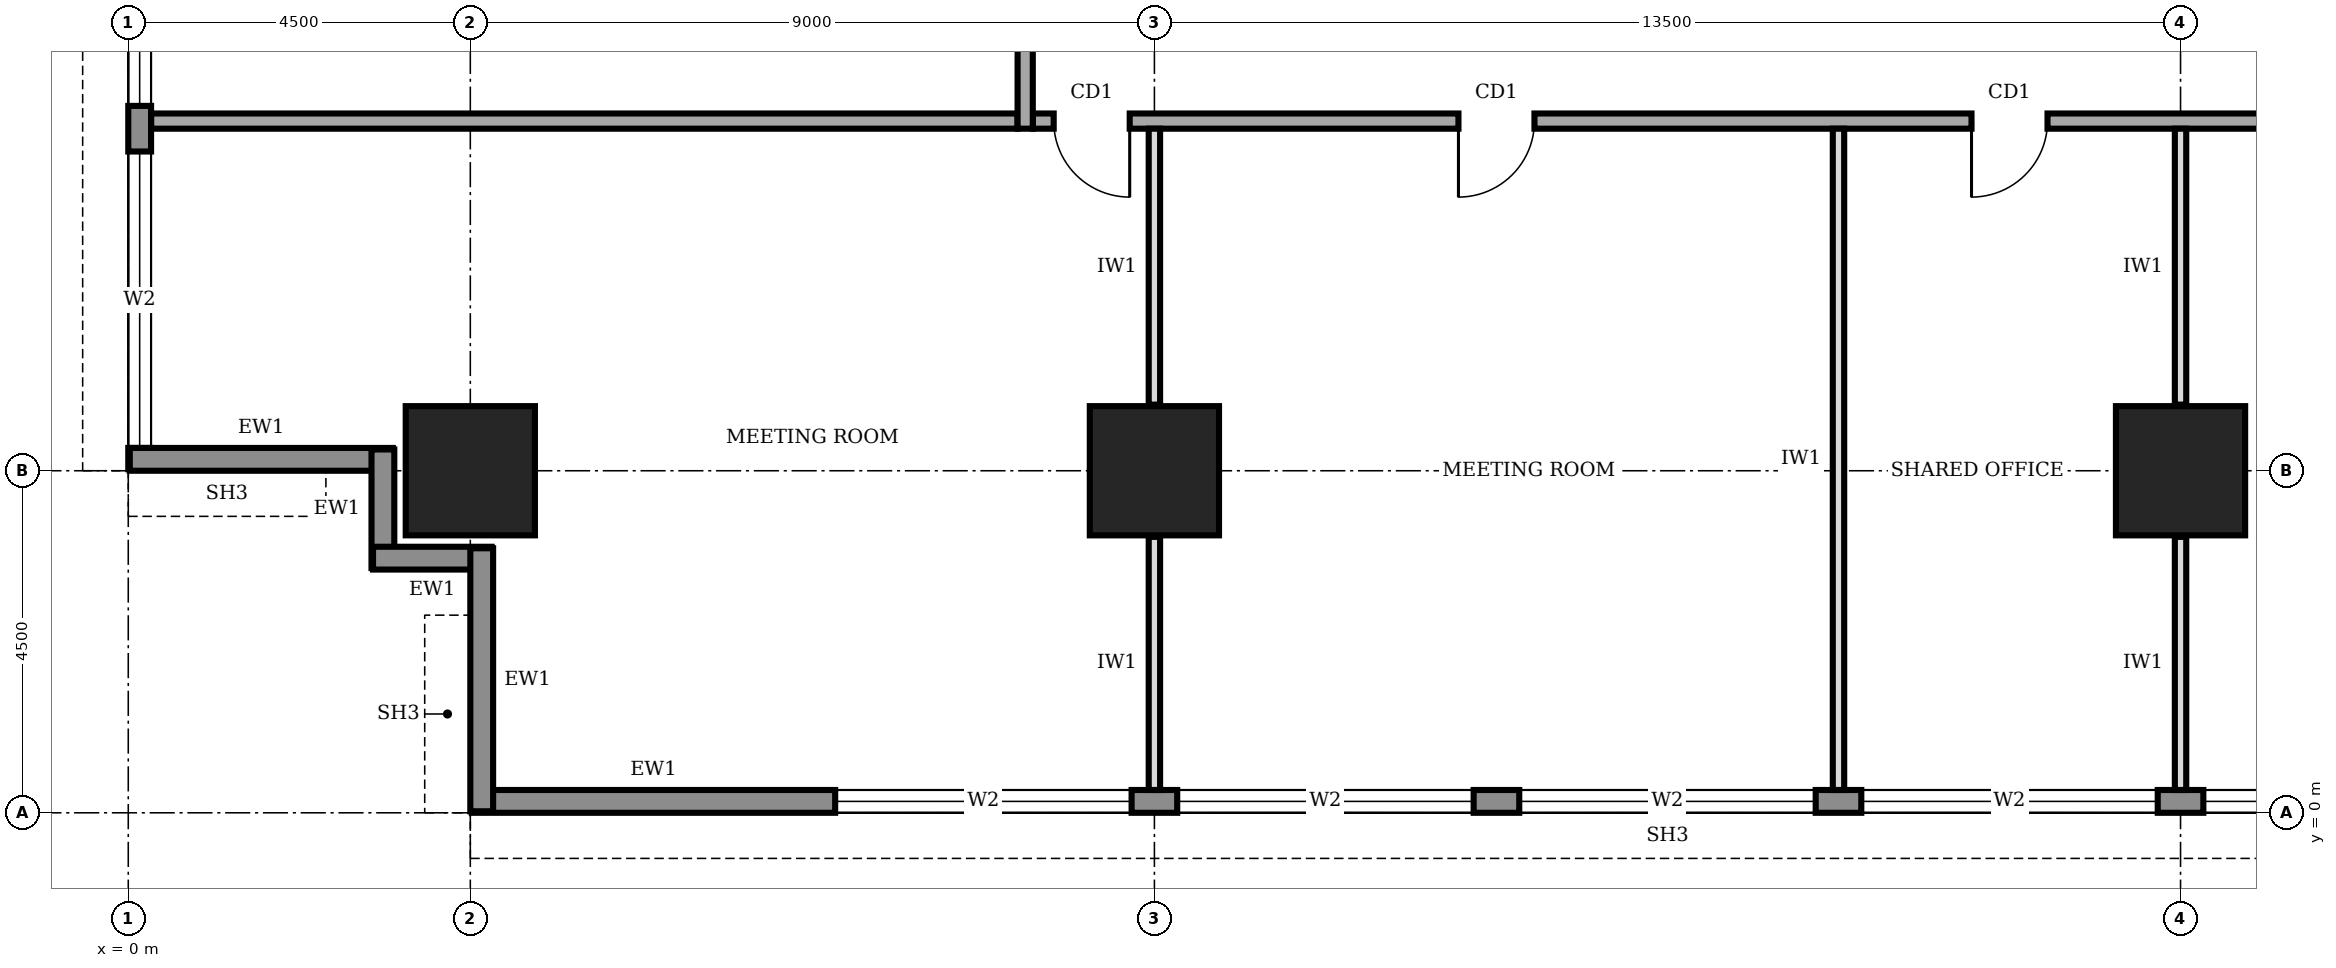
"""IFC4 building model, lengths in metres.
Left out: names, types, materials, properties, quantities, classifications, styles, units other than length and angle.
Written with IfcOpenShell. Run it as: python <this file> out.ifc"""

import sys

from ifc_helpers import new_model, si_unit, direction, frame, frame_2d, origin, origin_2d, place, context, subcontext, project, spatial, rectangle, extrude, element, fill, save


model = new_model("IFC4")
c1 = context("Model", 3, precision=1e-05, world=origin(), true_north=direction((0.0, 1.0)))
c2 = subcontext(c1, "Body", "Model", "MODEL_VIEW")
j1 = project(units=[si_unit("LENGTHUNIT", "METRE"), si_unit("PLANEANGLEUNIT", "RADIAN")], contexts=[c1])
p1 = place(None, origin())
s1 = spatial("IfcSite", under=j1, at=p1, CompositionType="ELEMENT")
p2 = place(p1, origin())
s2 = spatial("IfcBuilding", under=s1, at=p2, CompositionType="ELEMENT")
p3 = place(p2, frame((0.0, 0.0, 145.0)))
s3 = spatial("IfcBuildingStorey", under=s2, at=p3, CompositionType="ELEMENT", Elevation=145.0)
for number, where, z_axis, x_axis in (
    (1, (4.5, 4.5, 0.0), (0.0, 0.0, 1.0), (1.0, 0.0, 0.0)),
    (2, (13.5, 4.5, 0.0), (0.0, 0.0, 1.0), (1.0, 0.0, 0.0)),
    (3, (27.0, 4.5, 0.0), (0.0, 0.0, 1.0), (1.0, 0.0, 0.0)),
):
    element("IfcColumn", number, at=place(p3, frame(where, z_axis=z_axis, x_axis=x_axis)), inside=s3, PredefinedType="COLUMN", context=c2, shape_type="SweptSolid", body=[
        extrude(rectangle(XDim=1.7, YDim=1.7, at=origin_2d()), origin(), (0.0, 0.0, 1.0), 4.0),
    ])
p4 = place(p3, frame((4.52, 0.15, 0.0), z_axis=(0.0, 0.0, 1.0), x_axis=(1.0, 0.0, 0.0)))
e4 = element("IfcWall", 4, at=p4, inside=s3, PredefinedType="STANDARD", context=c2, shape_type="SweptSolid", body=[
    extrude(rectangle(XDim=31.46, YDim=0.3, at=frame_2d((15.73, 0.0))), origin(), (0.0, 0.0, 1.0), 3.75),
])
p5 = place(p4, frame((4.78, 0.0, 0.6)))
e5 = element("IfcOpeningElement", 5, at=p5, cuts=e4, PredefinedType="OPENING", context=c2, shape_type="SweptSolid", body=[
    extrude(rectangle(XDim=3.9, YDim=2.6, at=frame_2d((1.95, 1.3))), frame((0.0, 0.16, 0.0), z_axis=(0.0, -1.0, 0.0), x_axis=(1.0, 0.0, 0.0)), (0.0, 0.0, 1.0), 0.32),
])
p6 = place(p4, frame((9.28, 0.0, 0.6)))
e6 = element("IfcOpeningElement", 6, at=p6, cuts=e4, PredefinedType="OPENING", context=c2, shape_type="SweptSolid", body=[
    extrude(rectangle(XDim=3.9, YDim=2.6, at=frame_2d((1.95, 1.3))), frame((0.0, 0.16, 0.0), z_axis=(0.0, -1.0, 0.0), x_axis=(1.0, 0.0, 0.0)), (0.0, 0.0, 1.0), 0.32),
])
p7 = place(p4, frame((13.78, 0.0, 0.6)))
e7 = element("IfcOpeningElement", 7, at=p7, cuts=e4, PredefinedType="OPENING", context=c2, shape_type="SweptSolid", body=[
    extrude(rectangle(XDim=3.9, YDim=2.6, at=frame_2d((1.95, 1.3))), frame((0.0, 0.16, 0.0), z_axis=(0.0, -1.0, 0.0), x_axis=(1.0, 0.0, 0.0)), (0.0, 0.0, 1.0), 0.32),
])
p8 = place(p4, frame((18.28, 0.0, 0.6)))
e8 = element("IfcOpeningElement", 8, at=p8, cuts=e4, PredefinedType="OPENING", context=c2, shape_type="SweptSolid", body=[
    extrude(rectangle(XDim=3.9, YDim=2.6, at=frame_2d((1.95, 1.3))), frame((0.0, 0.16, 0.0), z_axis=(0.0, -1.0, 0.0), x_axis=(1.0, 0.0, 0.0)), (0.0, 0.0, 1.0), 0.32),
])
p9 = place(p4, frame((22.78, 0.0, 0.6)))
e9 = element("IfcOpeningElement", 9, at=p9, cuts=e4, PredefinedType="OPENING", context=c2, shape_type="SweptSolid", body=[
    extrude(rectangle(XDim=3.9, YDim=2.6, at=frame_2d((1.95, 1.3))), frame((0.0, 0.16, 0.0), z_axis=(0.0, -1.0, 0.0), x_axis=(1.0, 0.0, 0.0)), (0.0, 0.0, 1.0), 0.32),
])
p10 = place(p4, frame((27.28, 0.0, 0.6)))
e10 = element("IfcOpeningElement", 10, at=p10, cuts=e4, PredefinedType="OPENING", context=c2, shape_type="SweptSolid", body=[
    extrude(rectangle(XDim=3.9, YDim=2.6, at=frame_2d((1.95, 1.3))), frame((0.0, 0.16, 0.0), z_axis=(0.0, -1.0, 0.0), x_axis=(1.0, 0.0, 0.0)), (0.0, 0.0, 1.0), 0.32),
])
p11 = place(p3, frame((0.15, 35.98, 0.0), z_axis=(0.0, 0.0, 1.0), x_axis=(0.0, -1.0, 0.0)))
e11 = element("IfcWall", 11, at=p11, inside=s3, PredefinedType="STANDARD", context=c2, shape_type="SweptSolid", body=[
    extrude(rectangle(XDim=31.46, YDim=0.3, at=frame_2d((15.73, 0.0))), origin(), (0.0, 0.0, 1.0), 3.75),
])
p12 = place(p11, frame((27.28, 0.0, 0.6)))
e12 = element("IfcOpeningElement", 12, at=p12, cuts=e11, PredefinedType="OPENING", context=c2, shape_type="SweptSolid", body=[
    extrude(rectangle(XDim=3.9, YDim=2.6, at=frame_2d((1.95, 1.3))), frame((0.0, 0.16, 0.0), z_axis=(0.0, -1.0, 0.0), x_axis=(1.0, 0.0, 0.0)), (0.0, 0.0, 1.0), 0.32),
])
p13 = place(p11, frame((22.78, 0.0, 0.6)))
e13 = element("IfcOpeningElement", 13, at=p13, cuts=e11, PredefinedType="OPENING", context=c2, shape_type="SweptSolid", body=[
    extrude(rectangle(XDim=3.9, YDim=2.6, at=frame_2d((1.95, 1.3))), frame((0.0, 0.16, 0.0), z_axis=(0.0, -1.0, 0.0), x_axis=(1.0, 0.0, 0.0)), (0.0, 0.0, 1.0), 0.32),
])
p14 = place(p11, frame((18.28, 0.0, 0.6)))
e14 = element("IfcOpeningElement", 14, at=p14, cuts=e11, PredefinedType="OPENING", context=c2, shape_type="SweptSolid", body=[
    extrude(rectangle(XDim=3.9, YDim=2.6, at=frame_2d((1.95, 1.3))), frame((0.0, 0.16, 0.0), z_axis=(0.0, -1.0, 0.0), x_axis=(1.0, 0.0, 0.0)), (0.0, 0.0, 1.0), 0.32),
])
p15 = place(p11, frame((13.78, 0.0, 0.6)))
e15 = element("IfcOpeningElement", 15, at=p15, cuts=e11, PredefinedType="OPENING", context=c2, shape_type="SweptSolid", body=[
    extrude(rectangle(XDim=3.9, YDim=2.6, at=frame_2d((1.95, 1.3))), frame((0.0, 0.16, 0.0), z_axis=(0.0, -1.0, 0.0), x_axis=(1.0, 0.0, 0.0)), (0.0, 0.0, 1.0), 0.32),
])
p16 = place(p11, frame((9.28, 0.0, 0.6)))
e16 = element("IfcOpeningElement", 16, at=p16, cuts=e11, PredefinedType="OPENING", context=c2, shape_type="SweptSolid", body=[
    extrude(rectangle(XDim=3.9, YDim=2.6, at=frame_2d((1.95, 1.3))), frame((0.0, 0.16, 0.0), z_axis=(0.0, -1.0, 0.0), x_axis=(1.0, 0.0, 0.0)), (0.0, 0.0, 1.0), 0.32),
])
p17 = place(p11, frame((4.78, 0.0, 0.6)))
e17 = element("IfcOpeningElement", 17, at=p17, cuts=e11, PredefinedType="OPENING", context=c2, shape_type="SweptSolid", body=[
    extrude(rectangle(XDim=3.9, YDim=2.6, at=frame_2d((1.95, 1.3))), frame((0.0, 0.16, 0.0), z_axis=(0.0, -1.0, 0.0), x_axis=(1.0, 0.0, 0.0)), (0.0, 0.0, 1.0), 0.32),
])
p18 = place(p3, frame((0.02, 4.65, 0.0), z_axis=(0.0, 0.0, 1.0), x_axis=(1.0, 0.0, 0.0)))
e18 = element("IfcWall", 18, at=p18, inside=s3, PredefinedType="STANDARD", context=c2, shape_type="SweptSolid", body=[
    extrude(rectangle(XDim=3.46, YDim=0.3, at=frame_2d((1.73, 0.0))), origin(), (0.0, 0.0, 1.0), 2.85),
])
for number, where, z_axis, x_axis in (
    (19, (3.35, 4.78, 0.0), (0.0, 0.0, 1.0), (0.0, -1.0, 0.0)),
    (20, (3.22, 3.35, 0.0), (0.0, 0.0, 1.0), (1.0, 0.0, 0.0)),
):
    element("IfcWall", number, at=place(p3, frame(where, z_axis=z_axis, x_axis=x_axis)), inside=s3, PredefinedType="STANDARD", context=c2, shape_type="SweptSolid", body=[
        extrude(rectangle(XDim=1.56, YDim=0.3, at=frame_2d((0.78, 0.0))), origin(), (0.0, 0.0, 1.0), 3.75),
    ])
p19 = place(p3, frame((4.65, 3.48, 0.0), z_axis=(0.0, 0.0, 1.0), x_axis=(0.0, -1.0, 0.0)))
e21 = element("IfcWall", 21, at=p19, inside=s3, PredefinedType="STANDARD", context=c2, shape_type="SweptSolid", body=[
    extrude(rectangle(XDim=3.46, YDim=0.3, at=frame_2d((1.73, 0.0))), origin(), (0.0, 0.0, 1.0), 2.85),
])
p20 = place(p3, frame((11.9, 9.1, 0.0), z_axis=(0.0, 0.0, 1.0), x_axis=(1.0, 0.0, 0.0)))
e22 = element("IfcWall", 22, at=p20, inside=s3, PredefinedType="SOLIDWALL", context=c2, shape_type="SweptSolid", body=[
    extrude(rectangle(XDim=28.3, YDim=0.2, at=frame_2d((14.15, 0.0))), origin(), (0.0, 0.0, 1.0), 3.75),
])
p21 = place(p20, frame((0.275, 0.0, 0.0)))
e23 = element("IfcOpeningElement", 23, at=p21, cuts=e22, PredefinedType="OPENING", context=c2, shape_type="SweptSolid", body=[
    extrude(rectangle(XDim=1.0, YDim=2.1, at=frame_2d((0.5, 1.05))), frame((0.0, 0.11, 0.0), z_axis=(0.0, -1.0, 0.0), x_axis=(1.0, 0.0, 0.0)), (0.0, 0.0, 1.0), 0.22),
])
p22 = place(p20, frame((5.6, 0.0, 0.0)))
e24 = element("IfcOpeningElement", 24, at=p22, cuts=e22, PredefinedType="OPENING", context=c2, shape_type="SweptSolid", body=[
    extrude(rectangle(XDim=1.0, YDim=2.1, at=frame_2d((0.5, 1.05))), frame((0.0, 0.11, 0.0), z_axis=(0.0, -1.0, 0.0), x_axis=(1.0, 0.0, 0.0)), (0.0, 0.0, 1.0), 0.22),
])
p23 = place(p20, frame((12.35, 0.0, 0.0)))
e25 = element("IfcOpeningElement", 25, at=p23, cuts=e22, PredefinedType="OPENING", context=c2, shape_type="SweptSolid", body=[
    extrude(rectangle(XDim=1.0, YDim=2.1, at=frame_2d((0.5, 1.05))), frame((0.0, 0.11, 0.0), z_axis=(0.0, -1.0, 0.0), x_axis=(1.0, 0.0, 0.0)), (0.0, 0.0, 1.0), 0.22),
])
p24 = place(p20, frame((20.9, 0.0, 0.0)))
e26 = element("IfcOpeningElement", 26, at=p24, cuts=e22, PredefinedType="OPENING", context=c2, shape_type="SweptSolid", body=[
    extrude(rectangle(XDim=1.8, YDim=2.1, at=frame_2d((0.9, 1.05))), frame((0.0, 0.11, 0.0), z_axis=(0.0, -1.0, 0.0), x_axis=(1.0, 0.0, 0.0)), (0.0, 0.0, 1.0), 0.22),
])
p25 = place(p3, frame((11.8, 31.3, 0.0), z_axis=(0.0, 0.0, 1.0), x_axis=(0.0, -1.0, 0.0)))
e27 = element("IfcWall", 27, at=p25, inside=s3, PredefinedType="SOLIDWALL", context=c2, shape_type="SweptSolid", body=[
    extrude(rectangle(XDim=22.3, YDim=0.2, at=frame_2d((11.15, 0.0))), origin(), (0.0, 0.0, 1.0), 3.75),
])
p26 = place(p25, frame((19.55, 0.0, 0.0)))
e28 = element("IfcOpeningElement", 28, at=p26, cuts=e27, PredefinedType="OPENING", context=c2, shape_type="SweptSolid", body=[
    extrude(rectangle(XDim=1.0, YDim=2.1, at=frame_2d((0.5, 1.05))), frame((0.0, 0.11, 0.0), z_axis=(0.0, -1.0, 0.0), x_axis=(1.0, 0.0, 0.0)), (0.0, 0.0, 1.0), 0.22),
])
p27 = place(p25, frame((16.15, 0.0, 0.0)))
e29 = element("IfcOpeningElement", 29, at=p27, cuts=e27, PredefinedType="OPENING", context=c2, shape_type="SweptSolid", body=[
    extrude(rectangle(XDim=0.9, YDim=2.1, at=frame_2d((0.45, 1.05))), frame((0.0, 0.11, 0.0), z_axis=(0.0, -1.0, 0.0), x_axis=(1.0, 0.0, 0.0)), (0.0, 0.0, 1.0), 0.22),
])
p28 = place(p25, frame((12.95, 0.0, 0.0)))
e30 = element("IfcOpeningElement", 30, at=p28, cuts=e27, PredefinedType="OPENING", context=c2, shape_type="SweptSolid", body=[
    extrude(rectangle(XDim=0.9, YDim=2.1, at=frame_2d((0.45, 1.05))), frame((0.0, 0.11, 0.0), z_axis=(0.0, -1.0, 0.0), x_axis=(1.0, 0.0, 0.0)), (0.0, 0.0, 1.0), 0.22),
])
p29 = place(p25, frame((7.4, 0.0, 0.0)))
e31 = element("IfcOpeningElement", 31, at=p29, cuts=e27, PredefinedType="OPENING", context=c2, shape_type="SweptSolid", body=[
    extrude(rectangle(XDim=0.9, YDim=2.1, at=frame_2d((0.45, 1.05))), frame((0.0, 0.11, 0.0), z_axis=(0.0, -1.0, 0.0), x_axis=(1.0, 0.0, 0.0)), (0.0, 0.0, 1.0), 0.22),
])
p30 = place(p25, frame((4.8, 0.0, 0.0)))
e32 = element("IfcOpeningElement", 32, at=p30, cuts=e27, PredefinedType="OPENING", context=c2, shape_type="SweptSolid", body=[
    extrude(rectangle(XDim=1.0, YDim=2.1, at=frame_2d((0.5, 1.05))), frame((0.0, 0.11, 0.0), z_axis=(0.0, -1.0, 0.0), x_axis=(1.0, 0.0, 0.0)), (0.0, 0.0, 1.0), 0.22),
])
p31 = place(p25, frame((9.9, 0.0, 0.0)))
e33 = element("IfcOpeningElement", 33, at=p31, cuts=e27, PredefinedType="OPENING", context=c2, shape_type="SweptSolid", body=[
    extrude(rectangle(XDim=1.0, YDim=2.1, at=frame_2d((0.5, 1.05))), frame((0.0, 0.11, 0.0), z_axis=(0.0, -1.0, 0.0), x_axis=(1.0, 0.0, 0.0)), (0.0, 0.0, 1.0), 0.22),
])
p32 = place(p25, frame((1.55, 0.0, 0.0)))
e34 = element("IfcOpeningElement", 34, at=p32, cuts=e27, PredefinedType="OPENING", context=c2, shape_type="SweptSolid", body=[
    extrude(rectangle(XDim=1.0, YDim=2.1, at=frame_2d((0.5, 1.05))), frame((0.0, 0.11, 0.0), z_axis=(0.0, -1.0, 0.0), x_axis=(1.0, 0.0, 0.0)), (0.0, 0.0, 1.0), 0.22),
])
p33 = place(p3, frame((0.3, 9.1, 0.0), z_axis=(0.0, 0.0, 1.0), x_axis=(1.0, 0.0, 0.0)))
e35 = element("IfcWall", 35, at=p33, inside=s3, PredefinedType="SOLIDWALL", context=c2, shape_type="SweptSolid", body=[
    extrude(rectangle(XDim=11.4, YDim=0.2, at=frame_2d((5.7, 0.0))), origin(), (0.0, 0.0, 1.0), 3.75),
])
p34 = place(p3, frame((13.5, 0.3, 0.0), z_axis=(0.0, 0.0, 1.0), x_axis=(0.0, 1.0, 0.0)))
e36 = element("IfcWall", 36, at=p34, inside=s3, PredefinedType="PARTITIONING", context=c2, shape_type="SweptSolid", body=[
    extrude(rectangle(XDim=3.33, YDim=0.15, at=frame_2d((1.665, 0.0))), origin(), (0.0, 0.0, 1.0), 2.85),
])
p35 = place(p3, frame((13.5, 5.37, 0.0), z_axis=(0.0, 0.0, 1.0), x_axis=(0.0, 1.0, 0.0)))
e37 = element("IfcWall", 37, at=p35, inside=s3, PredefinedType="PARTITIONING", context=c2, shape_type="SweptSolid", body=[
    extrude(rectangle(XDim=3.63, YDim=0.15, at=frame_2d((1.815, 0.0))), origin(), (0.0, 0.0, 1.0), 2.85),
])
p36 = place(p3, frame((22.5, 0.3, 0.0), z_axis=(0.0, 0.0, 1.0), x_axis=(0.0, 1.0, 0.0)))
e38 = element("IfcWall", 38, at=p36, inside=s3, PredefinedType="PARTITIONING", context=c2, shape_type="SweptSolid", body=[
    extrude(rectangle(XDim=8.7, YDim=0.15, at=frame_2d((4.35, 0.0))), origin(), (0.0, 0.0, 1.0), 3.75),
])
p37 = place(p3, frame((27.0, 0.3, 0.0), z_axis=(0.0, 0.0, 1.0), x_axis=(0.0, 1.0, 0.0)))
e39 = element("IfcWall", 39, at=p37, inside=s3, PredefinedType="PARTITIONING", context=c2, shape_type="SweptSolid", body=[
    extrude(rectangle(XDim=3.33, YDim=0.15, at=frame_2d((1.665, 0.0))), origin(), (0.0, 0.0, 1.0), 2.85),
])
p38 = place(p3, frame((27.0, 5.37, 0.0), z_axis=(0.0, 0.0, 1.0), x_axis=(0.0, 1.0, 0.0)))
e40 = element("IfcWall", 40, at=p38, inside=s3, PredefinedType="PARTITIONING", context=c2, shape_type="SweptSolid", body=[
    extrude(rectangle(XDim=3.63, YDim=0.15, at=frame_2d((1.815, 0.0))), origin(), (0.0, 0.0, 1.0), 2.85),
])
p39 = place(p5, origin())
e41 = element("IfcWindow", 41, at=p39, inside=s3, PartitioningType="SINGLE_PANEL", PredefinedType="WINDOW", context=c2, shape_type="SweptSolid", body=[
    extrude(rectangle(XDim=3.9, YDim=2.6, at=frame_2d((1.95, 1.3))), frame((0.0, 0.03, 0.0), z_axis=(0.0, -1.0, 0.0), x_axis=(1.0, 0.0, 0.0)), (0.0, 0.0, 1.0), 0.06),
])
fill(e5, e41)
p40 = place(p6, origin())
e42 = element("IfcWindow", 42, at=p40, inside=s3, PartitioningType="SINGLE_PANEL", PredefinedType="WINDOW", context=c2, shape_type="SweptSolid", body=[
    extrude(rectangle(XDim=3.9, YDim=2.6, at=frame_2d((1.95, 1.3))), frame((0.0, 0.03, 0.0), z_axis=(0.0, -1.0, 0.0), x_axis=(1.0, 0.0, 0.0)), (0.0, 0.0, 1.0), 0.06),
])
fill(e6, e42)
p41 = place(p7, origin())
e43 = element("IfcWindow", 43, at=p41, inside=s3, PartitioningType="SINGLE_PANEL", PredefinedType="WINDOW", context=c2, shape_type="SweptSolid", body=[
    extrude(rectangle(XDim=3.9, YDim=2.6, at=frame_2d((1.95, 1.3))), frame((0.0, 0.03, 0.0), z_axis=(0.0, -1.0, 0.0), x_axis=(1.0, 0.0, 0.0)), (0.0, 0.0, 1.0), 0.06),
])
fill(e7, e43)
p42 = place(p8, origin())
e44 = element("IfcWindow", 44, at=p42, inside=s3, PartitioningType="SINGLE_PANEL", PredefinedType="WINDOW", context=c2, shape_type="SweptSolid", body=[
    extrude(rectangle(XDim=3.9, YDim=2.6, at=frame_2d((1.95, 1.3))), frame((0.0, 0.03, 0.0), z_axis=(0.0, -1.0, 0.0), x_axis=(1.0, 0.0, 0.0)), (0.0, 0.0, 1.0), 0.06),
])
fill(e8, e44)
p43 = place(p9, origin())
e45 = element("IfcWindow", 45, at=p43, inside=s3, PartitioningType="SINGLE_PANEL", PredefinedType="WINDOW", context=c2, shape_type="SweptSolid", body=[
    extrude(rectangle(XDim=3.9, YDim=2.6, at=frame_2d((1.95, 1.3))), frame((0.0, 0.03, 0.0), z_axis=(0.0, -1.0, 0.0), x_axis=(1.0, 0.0, 0.0)), (0.0, 0.0, 1.0), 0.06),
])
fill(e9, e45)
p44 = place(p12, origin())
e46 = element("IfcWindow", 46, at=p44, inside=s3, PartitioningType="SINGLE_PANEL", PredefinedType="WINDOW", context=c2, shape_type="SweptSolid", body=[
    extrude(rectangle(XDim=3.9, YDim=2.6, at=frame_2d((1.95, 1.3))), frame((0.0, 0.03, 0.0), z_axis=(0.0, -1.0, 0.0), x_axis=(1.0, 0.0, 0.0)), (0.0, 0.0, 1.0), 0.06),
])
fill(e12, e46)
p45 = place(p13, origin())
e47 = element("IfcWindow", 47, at=p45, inside=s3, PartitioningType="SINGLE_PANEL", PredefinedType="WINDOW", context=c2, shape_type="SweptSolid", body=[
    extrude(rectangle(XDim=3.9, YDim=2.6, at=frame_2d((1.95, 1.3))), frame((0.0, 0.03, 0.0), z_axis=(0.0, -1.0, 0.0), x_axis=(1.0, 0.0, 0.0)), (0.0, 0.0, 1.0), 0.06),
])
fill(e13, e47)
p46 = place(p21, frame((1.0, 0.0, 0.0), z_axis=(0.0, 0.0, 1.0), x_axis=(-1.0, 0.0, 0.0)))
e48 = element("IfcDoor", 48, at=p46, inside=s3, OperationType="SINGLE_SWING_LEFT", PredefinedType="DOOR", context=c2, shape_type="SweptSolid", body=[
    extrude(rectangle(XDim=1.0, YDim=2.1, at=frame_2d((0.5, 1.05))), frame((0.0, 0.025, 0.0), z_axis=(0.0, -1.0, 0.0), x_axis=(1.0, 0.0, 0.0)), (0.0, 0.0, 1.0), 0.05),
])
fill(e23, e48)
p47 = place(p22, frame((1.0, 0.0, 0.0), z_axis=(0.0, 0.0, 1.0), x_axis=(-1.0, 0.0, 0.0)))
e49 = element("IfcDoor", 49, at=p47, inside=s3, OperationType="SINGLE_SWING_RIGHT", PredefinedType="DOOR", context=c2, shape_type="SweptSolid", body=[
    extrude(rectangle(XDim=1.0, YDim=2.1, at=frame_2d((0.5, 1.05))), frame((0.0, 0.025, 0.0), z_axis=(0.0, -1.0, 0.0), x_axis=(1.0, 0.0, 0.0)), (0.0, 0.0, 1.0), 0.05),
])
fill(e24, e49)
p48 = place(p23, frame((1.0, 0.0, 0.0), z_axis=(0.0, 0.0, 1.0), x_axis=(-1.0, 0.0, 0.0)))
e50 = element("IfcDoor", 50, at=p48, inside=s3, OperationType="SINGLE_SWING_RIGHT", PredefinedType="DOOR", context=c2, shape_type="SweptSolid", body=[
    extrude(rectangle(XDim=1.0, YDim=2.1, at=frame_2d((0.5, 1.05))), frame((0.0, 0.025, 0.0), z_axis=(0.0, -1.0, 0.0), x_axis=(1.0, 0.0, 0.0)), (0.0, 0.0, 1.0), 0.05),
])
fill(e25, e50)
save(model, sys.argv[1])
